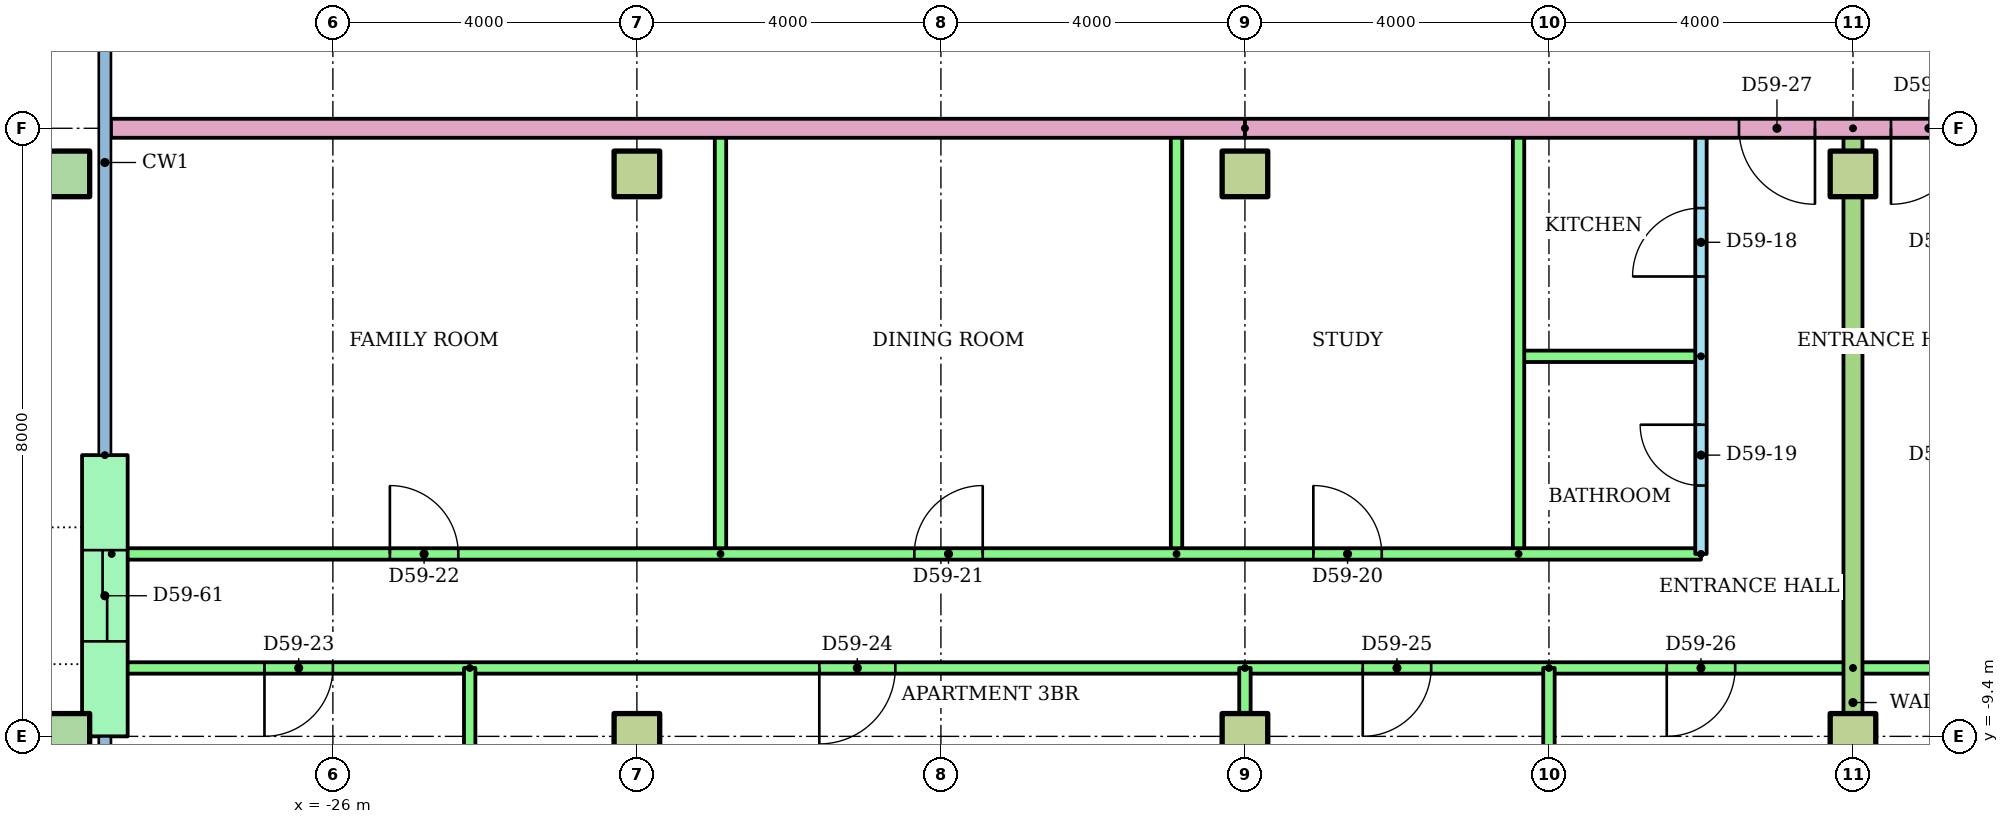
"""IFC4 building model, lengths in metres.
Left out: names, types, materials, properties, quantities, classifications, styles, units other than length and angle.
Written with IfcOpenShell. Run it as: python <this file> out.ifc"""

import sys

from ifc_helpers import new_model, si_unit, direction, frame, frame_2d, origin, origin_2d, place, context, subcontext, project, spatial, rectangle, hollow_rectangle, extrude, element, fill, save


model = new_model("IFC4")
c1 = context("Model", 3, precision=1e-05, world=origin(), true_north=direction((0.0, 1.0)))
c2 = subcontext(c1, "Body", "Model", "MODEL_VIEW")
j1 = project(units=[si_unit("LENGTHUNIT", "METRE"), si_unit("PLANEANGLEUNIT", "RADIAN")], contexts=[c1])
p1 = place(None, origin())
s1 = spatial("IfcSite", under=j1, at=p1, CompositionType="ELEMENT")
p2 = place(p1, origin())
s2 = spatial("IfcBuilding", under=s1, at=p2, CompositionType="ELEMENT")
p3 = place(p2, frame((0.0, 0.0, 226.8)))
s3 = spatial("IfcBuildingStorey", under=s2, at=p3, CompositionType="ELEMENT", Elevation=226.8)
p4 = place(p3, frame((-29.5, -9.4, 0.0)))
e1 = element("IfcColumn", 1, at=p4, inside=s3, PredefinedType="COLUMN", context=c2, shape_type="SweptSolid", body=[
    extrude(hollow_rectangle(XDim=0.6, YDim=0.6, WallThickness=0.03, at=origin_2d()), origin(), (0.0, 0.0, 1.0), 3.2),
])
for number, where in (
    (2, (-22.0, -9.4, 0.0)),
    (3, (-14.0, -9.4, 0.0)),
    (4, (-6.0, -9.4, 0.0)),
):
    element("IfcColumn", number, at=place(p3, frame(where)), inside=s3, PredefinedType="COLUMN", context=c2, shape_type="SweptSolid", body=[
        extrude(rectangle(XDim=0.6, YDim=0.6, at=origin_2d()), origin(), (0.0, 0.0, 1.0), 3.2),
    ])
p5 = place(p3, frame((-29.5, -2.0, 0.0)))
e5 = element("IfcColumn", 5, at=p5, inside=s3, PredefinedType="COLUMN", context=c2, shape_type="SweptSolid", body=[
    extrude(hollow_rectangle(XDim=0.6, YDim=0.6, WallThickness=0.03, at=origin_2d()), origin(), (0.0, 0.0, 1.0), 3.2),
])
for number, where in (
    (6, (-22.0, -2.0, 0.0)),
    (7, (-14.0, -2.0, 0.0)),
    (8, (-6.0, -2.0, 0.0)),
):
    element("IfcColumn", number, at=place(p3, frame(where)), inside=s3, PredefinedType="COLUMN", context=c2, shape_type="SweptSolid", body=[
        extrude(rectangle(XDim=0.6, YDim=0.6, at=origin_2d()), origin(), (0.0, 0.0, 1.0), 3.2),
    ])
p6 = place(p3, frame((-29.0, -5.7, 0.0), z_axis=(0.0, 0.0, 1.0), x_axis=(0.0, -1.0, 0.0)))
e9 = element("IfcWall", 9, at=p6, inside=s3, PredefinedType="STANDARD", context=c2, shape_type="SweptSolid", body=[
    extrude(rectangle(XDim=3.7, YDim=0.6, at=frame_2d((1.85, 0.0))), origin(), (0.0, 0.0, 1.0), 2.92),
])
p7 = place(p6, frame((1.25, 0.0, 0.0)))
e10 = element("IfcOpeningElement", 10, at=p7, cuts=e9, PredefinedType="OPENING", context=c2, shape_type="SweptSolid", body=[
    extrude(rectangle(XDim=1.2, YDim=2.1, at=frame_2d((0.6, 1.05))), frame((0.0, 0.31, 0.0), z_axis=(0.0, -1.0, 0.0), x_axis=(1.0, 0.0, 0.0)), (0.0, 0.0, 1.0), 0.62),
])
p8 = place(p3, frame((-8.0, -7.0, 0.0), z_axis=(0.0, 0.0, 1.0), x_axis=(0.0, 1.0, 0.0)))
e11 = element("IfcWall", 11, at=p8, inside=s3, PredefinedType="PARTITIONING", context=c2, shape_type="SweptSolid", body=[
    extrude(rectangle(XDim=5.6, YDim=0.15, at=frame_2d((2.8, 0.0))), origin(), (0.0, 0.0, 1.0), 2.4),
])
p9 = place(p8, frame((3.65, 0.0, 0.0)))
e12 = element("IfcOpeningElement", 12, at=p9, cuts=e11, PredefinedType="OPENING", context=c2, shape_type="SweptSolid", body=[
    extrude(rectangle(XDim=0.9, YDim=2.1, at=frame_2d((0.45, 1.05))), frame((0.0, 0.085, 0.0), z_axis=(0.0, -1.0, 0.0), x_axis=(1.0, 0.0, 0.0)), (0.0, 0.0, 1.0), 0.17),
])
p10 = place(p8, frame((0.9, 0.0, 0.0)))
e13 = element("IfcOpeningElement", 13, at=p10, cuts=e11, PredefinedType="OPENING", context=c2, shape_type="SweptSolid", body=[
    extrude(rectangle(XDim=0.8, YDim=2.1, at=frame_2d((0.4, 1.05))), frame((0.0, 0.085, 0.0), z_axis=(0.0, -1.0, 0.0), x_axis=(1.0, 0.0, 0.0)), (0.0, 0.0, 1.0), 0.17),
])
p11 = place(p3, frame((-8.0, -4.4, 0.0), z_axis=(0.0, 0.0, 1.0), x_axis=(-1.0, 0.0, 0.0)))
e14 = element("IfcWall", 14, at=p11, inside=s3, PredefinedType="PARTITIONING", context=c2, shape_type="SweptSolid", body=[
    extrude(rectangle(XDim=2.4, YDim=0.15, at=frame_2d((1.2, 0.0))), origin(), (0.0, 0.0, 1.0), 2.4),
])
for number, where, z_axis, x_axis in (
    (15, (-10.4, -7.0, 0.0), (0.0, 0.0, 1.0), (0.0, 1.0, 0.0)),
    (16, (-14.9, -7.0, 0.0), (0.0, 0.0, 1.0), (0.0, 1.0, 0.0)),
    (17, (-20.9, -7.0, 0.0), (0.0, 0.0, 1.0), (0.0, 1.0, 0.0)),
):
    element("IfcWall", number, at=place(p3, frame(where, z_axis=z_axis, x_axis=x_axis)), inside=s3, PredefinedType="PARTITIONING", context=c2, shape_type="SweptSolid", body=[
        extrude(rectangle(XDim=5.6, YDim=0.15, at=frame_2d((2.8, 0.0))), origin(), (0.0, 0.0, 1.0), 2.4),
    ])
p12 = place(p3, frame((-28.91, -7.0, 0.0)))
e18 = element("IfcWall", 18, at=p12, inside=s3, PredefinedType="PARTITIONING", context=c2, shape_type="SweptSolid", body=[
    extrude(rectangle(XDim=20.91, YDim=0.15, at=frame_2d((10.455, 0.0))), origin(), (0.0, 0.0, 1.0), 2.4),
])
p13 = place(p12, frame((15.81, 0.0, 0.0)))
e19 = element("IfcOpeningElement", 19, at=p13, cuts=e18, PredefinedType="OPENING", context=c2, shape_type="SweptSolid", body=[
    extrude(rectangle(XDim=0.9, YDim=2.1, at=frame_2d((0.45, 1.05))), frame((0.0, 0.085, 0.0), z_axis=(0.0, -1.0, 0.0), x_axis=(1.0, 0.0, 0.0)), (0.0, 0.0, 1.0), 0.17),
])
p14 = place(p12, frame((10.56, 0.0, 0.0)))
e20 = element("IfcOpeningElement", 20, at=p14, cuts=e18, PredefinedType="OPENING", context=c2, shape_type="SweptSolid", body=[
    extrude(rectangle(XDim=0.9, YDim=2.1, at=frame_2d((0.45, 1.05))), frame((0.0, 0.085, 0.0), z_axis=(0.0, -1.0, 0.0), x_axis=(1.0, 0.0, 0.0)), (0.0, 0.0, 1.0), 0.17),
])
p15 = place(p12, frame((3.66, 0.0, 0.0)))
e21 = element("IfcOpeningElement", 21, at=p15, cuts=e18, PredefinedType="OPENING", context=c2, shape_type="SweptSolid", body=[
    extrude(rectangle(XDim=0.9, YDim=2.1, at=frame_2d((0.45, 1.05))), frame((0.0, 0.085, 0.0), z_axis=(0.0, -1.0, 0.0), x_axis=(1.0, 0.0, 0.0)), (0.0, 0.0, 1.0), 0.17),
])
p16 = place(p3, frame((-6.0, -8.5, 0.0), z_axis=(0.0, 0.0, 1.0), x_axis=(-1.0, 0.0, 0.0)))
e22 = element("IfcWall", 22, at=p16, inside=s3, PredefinedType="PARTITIONING", context=c2, shape_type="SweptSolid", body=[
    extrude(rectangle(XDim=22.91, YDim=0.15, at=frame_2d((11.455, 0.0))), origin(), (0.0, 0.0, 1.0), 2.4),
])
p17 = place(p16, frame((20.0, 0.0, 0.0)))
e23 = element("IfcOpeningElement", 23, at=p17, cuts=e22, PredefinedType="OPENING", context=c2, shape_type="SweptSolid", body=[
    extrude(rectangle(XDim=0.9, YDim=2.1, at=frame_2d((0.45, 1.05))), frame((0.0, 0.085, 0.0), z_axis=(0.0, -1.0, 0.0), x_axis=(1.0, 0.0, 0.0)), (0.0, 0.0, 1.0), 0.17),
])
p18 = place(p16, frame((12.6, 0.0, 0.0)))
e24 = element("IfcOpeningElement", 24, at=p18, cuts=e22, PredefinedType="OPENING", context=c2, shape_type="SweptSolid", body=[
    extrude(rectangle(XDim=1.0, YDim=2.1, at=frame_2d((0.5, 1.05))), frame((0.0, 0.085, 0.0), z_axis=(0.0, -1.0, 0.0), x_axis=(1.0, 0.0, 0.0)), (0.0, 0.0, 1.0), 0.17),
])
p19 = place(p16, frame((5.55, 0.0, 0.0)))
e25 = element("IfcOpeningElement", 25, at=p19, cuts=e22, PredefinedType="OPENING", context=c2, shape_type="SweptSolid", body=[
    extrude(rectangle(XDim=0.9, YDim=2.1, at=frame_2d((0.45, 1.05))), frame((0.0, 0.085, 0.0), z_axis=(0.0, -1.0, 0.0), x_axis=(1.0, 0.0, 0.0)), (0.0, 0.0, 1.0), 0.17),
])
p20 = place(p16, frame((1.55, 0.0, 0.0)))
e26 = element("IfcOpeningElement", 26, at=p20, cuts=e22, PredefinedType="OPENING", context=c2, shape_type="SweptSolid", body=[
    extrude(rectangle(XDim=0.9, YDim=2.1, at=frame_2d((0.45, 1.05))), frame((0.0, 0.085, 0.0), z_axis=(0.0, -1.0, 0.0), x_axis=(1.0, 0.0, 0.0)), (0.0, 0.0, 1.0), 0.17),
])
p21 = place(p3, frame((-24.2, -8.5, 0.0), z_axis=(0.0, 0.0, 1.0), x_axis=(0.0, -1.0, 0.0)))
e27 = element("IfcWall", 27, at=p21, inside=s3, PredefinedType="PARTITIONING", context=c2, shape_type="SweptSolid", body=[
    extrude(rectangle(XDim=6.22, YDim=0.15, at=frame_2d((3.11, 0.0))), origin(), (0.0, 0.0, 1.0), 2.4),
])
p22 = place(p3, frame((-14.0, -8.5, 0.0), z_axis=(0.0, 0.0, 1.0), x_axis=(0.0, -1.0, 0.0)))
e28 = element("IfcWall", 28, at=p22, inside=s3, PredefinedType="PARTITIONING", context=c2, shape_type="SweptSolid", body=[
    extrude(rectangle(XDim=8.01, YDim=0.15, at=frame_2d((4.005, 0.0))), origin(), (0.0, 0.0, 1.0), 2.4),
])
p23 = place(p3, frame((-10.0, -8.5, 0.0), z_axis=(0.0, 0.0, 1.0), x_axis=(0.0, -1.0, 0.0)))
e29 = element("IfcWall", 29, at=p23, inside=s3, PredefinedType="PARTITIONING", context=c2, shape_type="SweptSolid", body=[
    extrude(rectangle(XDim=8.021, YDim=0.15, at=frame_2d((4.01, 0.0))), origin(), (0.0, 0.0, 1.0), 2.4),
])
p24 = place(p3, frame((10.0, -8.5, 0.0), z_axis=(0.0, 0.0, 1.0), x_axis=(-1.0, 0.0, 0.0)))
e30 = element("IfcWall", 30, at=p24, inside=s3, PredefinedType="PARTITIONING", context=c2, shape_type="SweptSolid", body=[
    extrude(rectangle(XDim=16.0, YDim=0.15, at=frame_2d((8.0, 0.0))), origin(), (0.0, 0.0, 1.0), 2.4),
])
p25 = place(p24, frame((11.5, 0.0, 0.0)))
e31 = element("IfcOpeningElement", 31, at=p25, cuts=e30, PredefinedType="OPENING", context=c2, shape_type="SweptSolid", body=[
    extrude(rectangle(XDim=1.0, YDim=2.1, at=frame_2d((0.5, 1.05))), frame((0.0, 0.085, 0.0), z_axis=(0.0, -1.0, 0.0), x_axis=(1.0, 0.0, 0.0)), (0.0, 0.0, 1.0), 0.17),
])
p26 = place(p24, frame((5.55, 0.0, 0.0)))
e32 = element("IfcOpeningElement", 32, at=p26, cuts=e30, PredefinedType="OPENING", context=c2, shape_type="SweptSolid", body=[
    extrude(rectangle(XDim=0.9, YDim=2.1, at=frame_2d((0.45, 1.05))), frame((0.0, 0.085, 0.0), z_axis=(0.0, -1.0, 0.0), x_axis=(1.0, 0.0, 0.0)), (0.0, 0.0, 1.0), 0.17),
])
p27 = place(p24, frame((1.55, 0.0, 0.0)))
e33 = element("IfcOpeningElement", 33, at=p27, cuts=e30, PredefinedType="OPENING", context=c2, shape_type="SweptSolid", body=[
    extrude(rectangle(XDim=0.9, YDim=2.1, at=frame_2d((0.45, 1.05))), frame((0.0, 0.085, 0.0), z_axis=(0.0, -1.0, 0.0), x_axis=(1.0, 0.0, 0.0)), (0.0, 0.0, 1.0), 0.17),
])
p28 = place(p3, frame((-6.0, -1.4, 0.0), z_axis=(0.0, 0.0, 1.0), x_axis=(0.0, -1.0, 0.0)))
e34 = element("IfcWall", 34, at=p28, inside=s3, PredefinedType="PARTITIONING", context=c2, shape_type="SweptSolid", body=[
    extrude(rectangle(XDim=15.11, YDim=0.25, at=frame_2d((7.555, 0.0))), origin(), (0.0, 0.0, 1.0), 2.4),
])
p29 = place(p3, frame((-14.0, -1.4, 0.0), z_axis=(0.0, 0.0, 1.0), x_axis=(-1.0, 0.0, 0.0)))
e35 = element("IfcWall", 35, at=p29, inside=s3, PredefinedType="PARTITIONING", context=c2, shape_type="SweptSolid", body=[
    extrude(rectangle(XDim=14.92, YDim=0.25, at=frame_2d((7.46, 0.0))), origin(), (0.0, 0.0, 1.0), 2.4),
])
p30 = place(p3, frame((14.0, -1.4, 0.0), z_axis=(0.0, 0.0, 1.0), x_axis=(-1.0, 0.0, 0.0)))
e36 = element("IfcWall", 36, at=p30, inside=s3, PredefinedType="PARTITIONING", context=c2, shape_type="SweptSolid", body=[
    extrude(rectangle(XDim=28.0, YDim=0.25, at=frame_2d((14.0, 0.0))), origin(), (0.0, 0.0, 1.0), 2.4),
])
p31 = place(p30, frame((20.5, 0.0, 0.0)))
e37 = element("IfcOpeningElement", 37, at=p31, cuts=e36, PredefinedType="OPENING", context=c2, shape_type="SweptSolid", body=[
    extrude(rectangle(XDim=1.0, YDim=2.1, at=frame_2d((0.5, 1.05))), frame((0.0, 0.135, 0.0), z_axis=(0.0, -1.0, 0.0), x_axis=(1.0, 0.0, 0.0)), (0.0, 0.0, 1.0), 0.27),
])
p32 = place(p30, frame((18.5, 0.0, 0.0)))
e38 = element("IfcOpeningElement", 38, at=p32, cuts=e36, PredefinedType="OPENING", context=c2, shape_type="SweptSolid", body=[
    extrude(rectangle(XDim=1.0, YDim=2.1, at=frame_2d((0.5, 1.05))), frame((0.0, 0.135, 0.0), z_axis=(0.0, -1.0, 0.0), x_axis=(1.0, 0.0, 0.0)), (0.0, 0.0, 1.0), 0.27),
])
p33 = place(p30, frame((2.5, 0.0, 0.0)))
e39 = element("IfcOpeningElement", 39, at=p33, cuts=e36, PredefinedType="OPENING", context=c2, shape_type="SweptSolid", body=[
    extrude(rectangle(XDim=1.0, YDim=2.1, at=frame_2d((0.5, 1.05))), frame((0.0, 0.135, 0.0), z_axis=(0.0, -1.0, 0.0), x_axis=(1.0, 0.0, 0.0)), (0.0, 0.0, 1.0), 0.27),
])
p34 = place(p9, origin())
e40 = element("IfcDoor", 40, at=p34, inside=s3, OperationType="SINGLE_SWING_LEFT", PredefinedType="DOOR", context=c2, shape_type="SweptSolid", body=[
    extrude(rectangle(XDim=0.9, YDim=2.1, at=frame_2d((0.45, 1.05))), frame((0.0, 0.025, 0.0), z_axis=(0.0, -1.0, 0.0), x_axis=(1.0, 0.0, 0.0)), (0.0, 0.0, 1.0), 0.05),
])
fill(e12, e40)
p35 = place(p10, origin())
e41 = element("IfcDoor", 41, at=p35, inside=s3, OperationType="SINGLE_SWING_RIGHT", PredefinedType="DOOR", context=c2, shape_type="SweptSolid", body=[
    extrude(rectangle(XDim=0.8, YDim=2.1, at=frame_2d((0.4, 1.05))), frame((0.0, 0.025, 0.0), z_axis=(0.0, -1.0, 0.0), x_axis=(1.0, 0.0, 0.0)), (0.0, 0.0, 1.0), 0.05),
])
fill(e13, e41)
p36 = place(p13, origin())
e42 = element("IfcDoor", 42, at=p36, inside=s3, OperationType="SINGLE_SWING_LEFT", PredefinedType="DOOR", context=c2, shape_type="SweptSolid", body=[
    extrude(rectangle(XDim=0.9, YDim=2.1, at=frame_2d((0.45, 1.05))), frame((0.0, 0.025, 0.0), z_axis=(0.0, -1.0, 0.0), x_axis=(1.0, 0.0, 0.0)), (0.0, 0.0, 1.0), 0.05),
])
fill(e19, e42)
p37 = place(p14, origin())
e43 = element("IfcDoor", 43, at=p37, inside=s3, OperationType="SINGLE_SWING_RIGHT", PredefinedType="DOOR", context=c2, shape_type="SweptSolid", body=[
    extrude(rectangle(XDim=0.9, YDim=2.1, at=frame_2d((0.45, 1.05))), frame((0.0, 0.025, 0.0), z_axis=(0.0, -1.0, 0.0), x_axis=(1.0, 0.0, 0.0)), (0.0, 0.0, 1.0), 0.05),
])
fill(e20, e43)
p38 = place(p15, origin())
e44 = element("IfcDoor", 44, at=p38, inside=s3, OperationType="SINGLE_SWING_LEFT", PredefinedType="DOOR", context=c2, shape_type="SweptSolid", body=[
    extrude(rectangle(XDim=0.9, YDim=2.1, at=frame_2d((0.45, 1.05))), frame((0.0, 0.025, 0.0), z_axis=(0.0, -1.0, 0.0), x_axis=(1.0, 0.0, 0.0)), (0.0, 0.0, 1.0), 0.05),
])
fill(e21, e44)
p39 = place(p17, origin())
e45 = element("IfcDoor", 45, at=p39, inside=s3, OperationType="SINGLE_SWING_RIGHT", PredefinedType="DOOR", context=c2, shape_type="SweptSolid", body=[
    extrude(rectangle(XDim=0.9, YDim=2.1, at=frame_2d((0.45, 1.05))), frame((0.0, 0.025, 0.0), z_axis=(0.0, -1.0, 0.0), x_axis=(1.0, 0.0, 0.0)), (0.0, 0.0, 1.0), 0.05),
])
fill(e23, e45)
p40 = place(p18, origin())
e46 = element("IfcDoor", 46, at=p40, inside=s3, OperationType="SINGLE_SWING_RIGHT", PredefinedType="DOOR", context=c2, shape_type="SweptSolid", body=[
    extrude(rectangle(XDim=1.0, YDim=2.1, at=frame_2d((0.5, 1.05))), frame((0.0, 0.025, 0.0), z_axis=(0.0, -1.0, 0.0), x_axis=(1.0, 0.0, 0.0)), (0.0, 0.0, 1.0), 0.05),
])
fill(e24, e46)
p41 = place(p19, origin())
e47 = element("IfcDoor", 47, at=p41, inside=s3, OperationType="SINGLE_SWING_RIGHT", PredefinedType="DOOR", context=c2, shape_type="SweptSolid", body=[
    extrude(rectangle(XDim=0.9, YDim=2.1, at=frame_2d((0.45, 1.05))), frame((0.0, 0.025, 0.0), z_axis=(0.0, -1.0, 0.0), x_axis=(1.0, 0.0, 0.0)), (0.0, 0.0, 1.0), 0.05),
])
fill(e25, e47)
p42 = place(p20, origin())
e48 = element("IfcDoor", 48, at=p42, inside=s3, OperationType="SINGLE_SWING_RIGHT", PredefinedType="DOOR", context=c2, shape_type="SweptSolid", body=[
    extrude(rectangle(XDim=0.9, YDim=2.1, at=frame_2d((0.45, 1.05))), frame((0.0, 0.025, 0.0), z_axis=(0.0, -1.0, 0.0), x_axis=(1.0, 0.0, 0.0)), (0.0, 0.0, 1.0), 0.05),
])
fill(e26, e48)
p43 = place(p31, origin())
e49 = element("IfcDoor", 49, at=p43, inside=s3, OperationType="SINGLE_SWING_LEFT", PredefinedType="DOOR", context=c2, shape_type="SweptSolid", body=[
    extrude(rectangle(XDim=1.0, YDim=2.1, at=frame_2d((0.5, 1.05))), frame((0.0, 0.025, 0.0), z_axis=(0.0, -1.0, 0.0), x_axis=(1.0, 0.0, 0.0)), (0.0, 0.0, 1.0), 0.05),
])
fill(e37, e49)
p44 = place(p32, origin())
e50 = element("IfcDoor", 50, at=p44, inside=s3, OperationType="SINGLE_SWING_RIGHT", PredefinedType="DOOR", context=c2, shape_type="SweptSolid", body=[
    extrude(rectangle(XDim=1.0, YDim=2.1, at=frame_2d((0.5, 1.05))), frame((0.0, 0.025, 0.0), z_axis=(0.0, -1.0, 0.0), x_axis=(1.0, 0.0, 0.0)), (0.0, 0.0, 1.0), 0.05),
])
fill(e38, e50)
p45 = place(p7, origin())
e51 = element("IfcDoor", 51, at=p45, inside=s3, OperationType="SLIDING_TO_LEFT", PredefinedType="DOOR", context=c2, shape_type="SweptSolid", body=[
    extrude(rectangle(XDim=1.2, YDim=2.1, at=frame_2d((0.6, 1.05))), frame((0.0, 0.025, 0.0), z_axis=(0.0, -1.0, 0.0), x_axis=(1.0, 0.0, 0.0)), (0.0, 0.0, 1.0), 0.05),
])
fill(e10, e51)
save(model, sys.argv[1])
